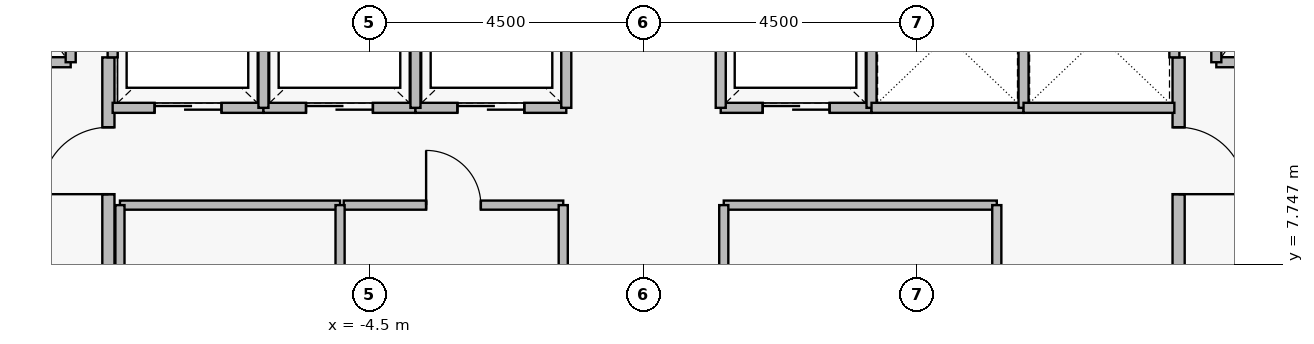
"""IFC4 building model, lengths in metres.
Left out: names, types, materials, properties, quantities, classifications, styles, units other than length and angle.
Written with IfcOpenShell. Run it as: python <this file> out.ifc"""

import sys

from ifc_helpers import new_model, si_unit, direction, frame, frame_2d, origin, place, context, subcontext, project, spatial, rectangle, extrude, element, fill, save


model = new_model("IFC4")
c1 = context("Model", 3, precision=1e-05, world=origin(), true_north=direction((0.0, 1.0)))
c2 = subcontext(c1, "Body", "Model", "MODEL_VIEW")
j1 = project(units=[si_unit("LENGTHUNIT", "METRE"), si_unit("PLANEANGLEUNIT", "RADIAN")], contexts=[c1])
p1 = place(None, origin())
s1 = spatial("IfcSite", under=j1, at=p1, CompositionType="ELEMENT")
p2 = place(p1, origin())
s2 = spatial("IfcBuilding", under=s1, at=p2, CompositionType="ELEMENT")
p3 = place(p2, frame((0.0, 0.0, 18.0)))
s3 = spatial("IfcBuildingStorey", under=s2, at=p3, CompositionType="ELEMENT", Elevation=18.0)
p4 = place(p3, frame((-8.8, 5.05, 0.0), z_axis=(0.0, 0.0, 1.0), x_axis=(0.0, 1.0, 0.0)))
e1 = element("IfcWall", 1, at=p4, inside=s3, PredefinedType="PARTITIONING", context=c2, shape_type="SweptSolid", body=[
    extrude(rectangle(XDim=6.1, YDim=0.2, at=frame_2d((3.05, 0.0))), origin(), (0.0, 0.0, 1.0), 4.54),
])
p5 = place(p4, frame((0.25, 0.0, 0.0)))
e2 = element("IfcOpeningElement", 2, at=p5, cuts=e1, PredefinedType="OPENING", context=c2, shape_type="SweptSolid", body=[
    extrude(rectangle(XDim=1.1, YDim=2.2, at=frame_2d((0.55, 1.1))), frame((0.0, 0.11, 0.0), z_axis=(0.0, -1.0, 0.0), x_axis=(1.0, 0.0, 0.0)), (0.0, 0.0, 1.0), 0.22),
])
p6 = place(p4, frame((3.85, 0.0, 0.0)))
e3 = element("IfcOpeningElement", 3, at=p6, cuts=e1, PredefinedType="OPENING", context=c2, shape_type="SweptSolid", body=[
    extrude(rectangle(XDim=1.1, YDim=2.2, at=frame_2d((0.55, 1.1))), frame((0.0, 0.11, 0.0), z_axis=(0.0, -1.0, 0.0), x_axis=(1.0, 0.0, 0.0)), (0.0, 0.0, 1.0), 0.22),
])
p7 = place(p3, frame((8.8, 11.15, 0.0), z_axis=(0.0, 0.0, 1.0), x_axis=(0.0, -1.0, 0.0)))
e4 = element("IfcWall", 4, at=p7, inside=s3, PredefinedType="PARTITIONING", context=c2, shape_type="SweptSolid", body=[
    extrude(rectangle(XDim=6.1, YDim=0.2, at=frame_2d((3.05, 0.0))), origin(), (0.0, 0.0, 1.0), 4.54),
])
p8 = place(p7, frame((1.15, 0.0, 0.0)))
e5 = element("IfcOpeningElement", 5, at=p8, cuts=e4, PredefinedType="OPENING", context=c2, shape_type="SweptSolid", body=[
    extrude(rectangle(XDim=1.1, YDim=2.2, at=frame_2d((0.55, 1.1))), frame((0.0, 0.11, 0.0), z_axis=(0.0, -1.0, 0.0), x_axis=(1.0, 0.0, 0.0)), (0.0, 0.0, 1.0), 0.22),
])
p9 = place(p7, frame((4.75, 0.0, 0.0)))
e6 = element("IfcOpeningElement", 6, at=p9, cuts=e4, PredefinedType="OPENING", context=c2, shape_type="SweptSolid", body=[
    extrude(rectangle(XDim=1.1, YDim=2.2, at=frame_2d((0.55, 1.1))), frame((0.0, 0.11, 0.0), z_axis=(0.0, -1.0, 0.0), x_axis=(1.0, 0.0, 0.0)), (0.0, 0.0, 1.0), 0.22),
])
p10 = place(p3, frame((-11.58, 11.07, 0.0), z_axis=(0.0, 0.0, 1.0), x_axis=(1.0, 0.0, 0.0)))
e7 = element("IfcWall", 7, at=p10, inside=s3, PredefinedType="PARTITIONING", context=c2, shape_type="SweptSolid", body=[
    extrude(rectangle(XDim=2.16, YDim=0.165, at=frame_2d((1.08, 0.0))), origin(), (0.0, 0.0, 1.0), 4.54),
])
p11 = place(p10, frame((0.53, 0.0, 0.0)))
e8 = element("IfcOpeningElement", 8, at=p11, cuts=e7, PredefinedType="OPENING", context=c2, shape_type="SweptSolid", body=[
    extrude(rectangle(XDim=1.15, YDim=2.25, at=frame_2d((0.575, 1.125))), frame((0.0, 0.093, 0.0), z_axis=(0.0, -1.0, 0.0), x_axis=(1.0, 0.0, 0.0)), (0.0, 0.0, 1.0), 0.185),
])
p12 = place(p3, frame((9.42, 11.07, 0.0), z_axis=(0.0, 0.0, 1.0), x_axis=(1.0, 0.0, 0.0)))
e9 = element("IfcWall", 9, at=p12, inside=s3, PredefinedType="PARTITIONING", context=c2, shape_type="SweptSolid", body=[
    extrude(rectangle(XDim=2.16, YDim=0.165, at=frame_2d((1.08, 0.0))), origin(), (0.0, 0.0, 1.0), 4.54),
])
p13 = place(p12, frame((0.53, 0.0, 0.0)))
e10 = element("IfcOpeningElement", 10, at=p13, cuts=e9, PredefinedType="OPENING", context=c2, shape_type="SweptSolid", body=[
    extrude(rectangle(XDim=1.15, YDim=2.25, at=frame_2d((0.575, 1.125))), frame((0.0, 0.093, 0.0), z_axis=(0.0, -1.0, 0.0), x_axis=(1.0, 0.0, 0.0)), (0.0, 0.0, 1.0), 0.185),
])
p14 = place(p3, frame((-8.73, 10.32, 0.0), z_axis=(0.0, 0.0, 1.0), x_axis=(1.0, 0.0, 0.0)))
e11 = element("IfcWall", 11, at=p14, inside=s3, PredefinedType="PARTITIONING", context=c2, shape_type="SweptSolid", body=[
    extrude(rectangle(XDim=2.48, YDim=0.165, at=frame_2d((1.24, 0.0))), origin(), (0.0, 0.0, 1.0), 4.54),
])
p15 = place(p14, frame((0.69, 0.0, 0.0)))
e12 = element("IfcOpeningElement", 12, at=p15, cuts=e11, PredefinedType="OPENING", context=c2, shape_type="SweptSolid", body=[
    extrude(rectangle(XDim=1.1, YDim=2.25, at=frame_2d((0.55, 1.125))), frame((0.0, 0.093, 0.0), z_axis=(0.0, -1.0, 0.0), x_axis=(1.0, 0.0, 0.0)), (0.0, 0.0, 1.0), 0.185),
])
p16 = place(p3, frame((-6.25, 10.32, 0.0), z_axis=(0.0, 0.0, 1.0), x_axis=(1.0, 0.0, 0.0)))
e13 = element("IfcWall", 13, at=p16, inside=s3, PredefinedType="PARTITIONING", context=c2, shape_type="SweptSolid", body=[
    extrude(rectangle(XDim=2.5, YDim=0.165, at=frame_2d((1.25, 0.0))), origin(), (0.0, 0.0, 1.0), 4.54),
])
p17 = place(p16, frame((0.7, 0.0, 0.0)))
e14 = element("IfcOpeningElement", 14, at=p17, cuts=e13, PredefinedType="OPENING", context=c2, shape_type="SweptSolid", body=[
    extrude(rectangle(XDim=1.1, YDim=2.25, at=frame_2d((0.55, 1.125))), frame((0.0, 0.093, 0.0), z_axis=(0.0, -1.0, 0.0), x_axis=(1.0, 0.0, 0.0)), (0.0, 0.0, 1.0), 0.185),
])
p18 = place(p3, frame((-3.75, 10.32, 0.0), z_axis=(0.0, 0.0, 1.0), x_axis=(1.0, 0.0, 0.0)))
e15 = element("IfcWall", 15, at=p18, inside=s3, PredefinedType="PARTITIONING", context=c2, shape_type="SweptSolid", body=[
    extrude(rectangle(XDim=2.48, YDim=0.165, at=frame_2d((1.24, 0.0))), origin(), (0.0, 0.0, 1.0), 4.54),
])
p19 = place(p18, frame((0.69, 0.0, 0.0)))
e16 = element("IfcOpeningElement", 16, at=p19, cuts=e15, PredefinedType="OPENING", context=c2, shape_type="SweptSolid", body=[
    extrude(rectangle(XDim=1.1, YDim=2.25, at=frame_2d((0.55, 1.125))), frame((0.0, 0.093, 0.0), z_axis=(0.0, -1.0, 0.0), x_axis=(1.0, 0.0, 0.0)), (0.0, 0.0, 1.0), 0.185),
])
p20 = place(p3, frame((1.27, 10.32, 0.0), z_axis=(0.0, 0.0, 1.0), x_axis=(1.0, 0.0, 0.0)))
e17 = element("IfcWall", 17, at=p20, inside=s3, PredefinedType="PARTITIONING", context=c2, shape_type="SweptSolid", body=[
    extrude(rectangle(XDim=2.48, YDim=0.165, at=frame_2d((1.24, 0.0))), origin(), (0.0, 0.0, 1.0), 4.54),
])
p21 = place(p20, frame((0.69, 0.0, 0.0)))
e18 = element("IfcOpeningElement", 18, at=p21, cuts=e17, PredefinedType="OPENING", context=c2, shape_type="SweptSolid", body=[
    extrude(rectangle(XDim=1.1, YDim=2.25, at=frame_2d((0.55, 1.125))), frame((0.0, 0.093, 0.0), z_axis=(0.0, -1.0, 0.0), x_axis=(1.0, 0.0, 0.0)), (0.0, 0.0, 1.0), 0.185),
])
p22 = place(p3, frame((-4.93, 8.72, 0.0), z_axis=(0.0, 0.0, 1.0), x_axis=(1.0, 0.0, 0.0)))
e19 = element("IfcWall", 19, at=p22, inside=s3, PredefinedType="PARTITIONING", context=c2, shape_type="SweptSolid", body=[
    extrude(rectangle(XDim=3.61, YDim=0.15, at=frame_2d((1.805, 0.0))), origin(), (0.0, 0.0, 1.0), 4.54),
])
p23 = place(p22, frame((1.355, 0.0, 0.0)))
e20 = element("IfcOpeningElement", 20, at=p23, cuts=e19, PredefinedType="OPENING", context=c2, shape_type="SweptSolid", body=[
    extrude(rectangle(XDim=0.9, YDim=2.15, at=frame_2d((0.45, 1.075))), frame((0.0, 0.085, 0.0), z_axis=(0.0, -1.0, 0.0), x_axis=(1.0, 0.0, 0.0)), (0.0, 0.0, 1.0), 0.17),
])
for number, where, z_axis, x_axis in (
    (21, (-9.42, 11.07, 0.0), (0.0, 0.0, 1.0), (0.0, 1.0, 0.0)),
    (22, (9.42, 11.07, 0.0), (0.0, 0.0, 1.0), (0.0, 1.0, 0.0)),
):
    element("IfcWall", number, at=place(p3, frame(where, z_axis=z_axis, x_axis=x_axis)), inside=s3, PredefinedType="PARTITIONING", context=c2, shape_type="SweptSolid", body=[
        extrude(rectangle(XDim=2.96, YDim=0.165, at=frame_2d((1.48, 0.0))), origin(), (0.0, 0.0, 1.0), 4.54),
    ])
p24 = place(p3, frame((-8.73, 11.15, 0.0), z_axis=(0.0, 0.0, 1.0), x_axis=(0.0, 1.0, 0.0)))
e23 = element("IfcWall", 23, at=p24, inside=s3, PredefinedType="PARTITIONING", context=c2, shape_type="SweptSolid", body=[
    extrude(rectangle(XDim=1.53, YDim=0.165, at=frame_2d((0.765, 0.0))), origin(), (0.0, 0.0, 1.0), 4.54),
])
for number, where, z_axis, x_axis in (
    (24, (-6.25, 10.32, 0.0), (0.0, 0.0, 1.0), (0.0, 1.0, 0.0)),
    (25, (-3.75, 10.32, 0.0), (0.0, 0.0, 1.0), (0.0, 1.0, 0.0)),
    (26, (-1.27, 10.32, 0.0), (0.0, 0.0, 1.0), (0.0, 1.0, 0.0)),
    (27, (1.27, 10.32, 0.0), (0.0, 0.0, 1.0), (0.0, 1.0, 0.0)),
    (28, (3.75, 10.32, 0.0), (0.0, 0.0, 1.0), (0.0, 1.0, 0.0)),
):
    element("IfcWall", number, at=place(p3, frame(where, z_axis=z_axis, x_axis=x_axis)), inside=s3, PredefinedType="PARTITIONING", context=c2, shape_type="SweptSolid", body=[
        extrude(rectangle(XDim=2.36, YDim=0.165, at=frame_2d((1.18, 0.0))), origin(), (0.0, 0.0, 1.0), 4.54),
    ])
p25 = place(p3, frame((3.75, 10.32, 0.0), z_axis=(0.0, 0.0, 1.0), x_axis=(1.0, 0.0, 0.0)))
e29 = element("IfcWall", 29, at=p25, inside=s3, PredefinedType="PARTITIONING", context=c2, shape_type="SweptSolid", body=[
    extrude(rectangle(XDim=2.5, YDim=0.165, at=frame_2d((1.25, 0.0))), origin(), (0.0, 0.0, 1.0), 4.54),
])
p26 = place(p3, frame((6.25, 10.32, 0.0), z_axis=(0.0, 0.0, 1.0), x_axis=(0.0, 1.0, 0.0)))
e30 = element("IfcWall", 30, at=p26, inside=s3, PredefinedType="PARTITIONING", context=c2, shape_type="SweptSolid", body=[
    extrude(rectangle(XDim=2.36, YDim=0.165, at=frame_2d((1.18, 0.0))), origin(), (0.0, 0.0, 1.0), 4.54),
])
p27 = place(p3, frame((6.25, 10.32, 0.0), z_axis=(0.0, 0.0, 1.0), x_axis=(1.0, 0.0, 0.0)))
e31 = element("IfcWall", 31, at=p27, inside=s3, PredefinedType="PARTITIONING", context=c2, shape_type="SweptSolid", body=[
    extrude(rectangle(XDim=2.48, YDim=0.165, at=frame_2d((1.24, 0.0))), origin(), (0.0, 0.0, 1.0), 4.54),
])
p28 = place(p3, frame((8.73, 11.15, 0.0), z_axis=(0.0, 0.0, 1.0), x_axis=(0.0, 1.0, 0.0)))
e32 = element("IfcWall", 32, at=p28, inside=s3, PredefinedType="PARTITIONING", context=c2, shape_type="SweptSolid", body=[
    extrude(rectangle(XDim=1.53, YDim=0.165, at=frame_2d((0.765, 0.0))), origin(), (0.0, 0.0, 1.0), 4.54),
])
p29 = place(p3, frame((-8.61, 8.72, 0.0), z_axis=(0.0, 0.0, 1.0), x_axis=(1.0, 0.0, 0.0)))
e33 = element("IfcWall", 33, at=p29, inside=s3, PredefinedType="PARTITIONING", context=c2, shape_type="SweptSolid", body=[
    extrude(rectangle(XDim=3.62, YDim=0.15, at=frame_2d((1.81, 0.0))), origin(), (0.0, 0.0, 1.0), 4.54),
])
for number, where, z_axis, x_axis in (
    (34, (-8.61, 6.48, 0.0), (0.0, 0.0, 1.0), (0.0, 1.0, 0.0)),
    (35, (-4.99, 6.48, 0.0), (0.0, 0.0, 1.0), (0.0, 1.0, 0.0)),
    (36, (-1.32, 6.48, 0.0), (0.0, 0.0, 1.0), (0.0, 1.0, 0.0)),
):
    element("IfcWall", number, at=place(p3, frame(where, z_axis=z_axis, x_axis=x_axis)), inside=s3, PredefinedType="PARTITIONING", context=c2, shape_type="SweptSolid", body=[
        extrude(rectangle(XDim=2.24, YDim=0.15, at=frame_2d((1.12, 0.0))), origin(), (0.0, 0.0, 1.0), 4.54),
    ])
p30 = place(p3, frame((1.32, 8.72, 0.0), z_axis=(0.0, 0.0, 1.0), x_axis=(1.0, 0.0, 0.0)))
e37 = element("IfcWall", 37, at=p30, inside=s3, PredefinedType="PARTITIONING", context=c2, shape_type="SweptSolid", body=[
    extrude(rectangle(XDim=4.49, YDim=0.15, at=frame_2d((2.245, 0.0))), origin(), (0.0, 0.0, 1.0), 4.54),
])
for number, where, z_axis, x_axis in (
    (38, (1.32, 6.48, 0.0), (0.0, 0.0, 1.0), (0.0, 1.0, 0.0)),
    (39, (5.81, 6.48, 0.0), (0.0, 0.0, 1.0), (0.0, 1.0, 0.0)),
):
    element("IfcWall", number, at=place(p3, frame(where, z_axis=z_axis, x_axis=x_axis)), inside=s3, PredefinedType="PARTITIONING", context=c2, shape_type="SweptSolid", body=[
        extrude(rectangle(XDim=2.24, YDim=0.15, at=frame_2d((1.12, 0.0))), origin(), (0.0, 0.0, 1.0), 4.54),
    ])
p31 = place(p6, origin())
e40 = element("IfcDoor", 40, at=p31, inside=s3, OperationType="SINGLE_SWING_LEFT", PredefinedType="DOOR", context=c2, shape_type="SweptSolid", body=[
    extrude(rectangle(XDim=1.1, YDim=2.2, at=frame_2d((0.55, 1.1))), frame((0.0, 0.025, 0.0), z_axis=(0.0, -1.0, 0.0), x_axis=(1.0, 0.0, 0.0)), (0.0, 0.0, 1.0), 0.05),
])
fill(e3, e40)
p32 = place(p8, origin())
e41 = element("IfcDoor", 41, at=p32, inside=s3, OperationType="SINGLE_SWING_RIGHT", PredefinedType="DOOR", context=c2, shape_type="SweptSolid", body=[
    extrude(rectangle(XDim=1.1, YDim=2.2, at=frame_2d((0.55, 1.1))), frame((0.0, 0.025, 0.0), z_axis=(0.0, -1.0, 0.0), x_axis=(1.0, 0.0, 0.0)), (0.0, 0.0, 1.0), 0.05),
])
fill(e5, e41)
p33 = place(p15, origin())
e42 = element("IfcDoor", 42, at=p33, inside=s3, OperationType="SLIDING_TO_LEFT", PredefinedType="DOOR", context=c2, shape_type="SweptSolid", body=[
    extrude(rectangle(XDim=1.1, YDim=2.25, at=frame_2d((0.55, 1.125))), frame((0.0, 0.025, 0.0), z_axis=(0.0, -1.0, 0.0), x_axis=(1.0, 0.0, 0.0)), (0.0, 0.0, 1.0), 0.05),
])
fill(e12, e42)
p34 = place(p17, origin())
e43 = element("IfcDoor", 43, at=p34, inside=s3, OperationType="SLIDING_TO_LEFT", PredefinedType="DOOR", context=c2, shape_type="SweptSolid", body=[
    extrude(rectangle(XDim=1.1, YDim=2.25, at=frame_2d((0.55, 1.125))), frame((0.0, 0.025, 0.0), z_axis=(0.0, -1.0, 0.0), x_axis=(1.0, 0.0, 0.0)), (0.0, 0.0, 1.0), 0.05),
])
fill(e14, e43)
p35 = place(p19, origin())
e44 = element("IfcDoor", 44, at=p35, inside=s3, OperationType="SLIDING_TO_LEFT", PredefinedType="DOOR", context=c2, shape_type="SweptSolid", body=[
    extrude(rectangle(XDim=1.1, YDim=2.25, at=frame_2d((0.55, 1.125))), frame((0.0, 0.025, 0.0), z_axis=(0.0, -1.0, 0.0), x_axis=(1.0, 0.0, 0.0)), (0.0, 0.0, 1.0), 0.05),
])
fill(e16, e44)
p36 = place(p21, origin())
e45 = element("IfcDoor", 45, at=p36, inside=s3, OperationType="SLIDING_TO_LEFT", PredefinedType="DOOR", context=c2, shape_type="SweptSolid", body=[
    extrude(rectangle(XDim=1.1, YDim=2.25, at=frame_2d((0.55, 1.125))), frame((0.0, 0.025, 0.0), z_axis=(0.0, -1.0, 0.0), x_axis=(1.0, 0.0, 0.0)), (0.0, 0.0, 1.0), 0.05),
])
fill(e18, e45)
p37 = place(p23, origin())
e46 = element("IfcDoor", 46, at=p37, inside=s3, OperationType="SINGLE_SWING_LEFT", PredefinedType="DOOR", context=c2, shape_type="SweptSolid", body=[
    extrude(rectangle(XDim=0.9, YDim=2.15, at=frame_2d((0.45, 1.075))), frame((0.0, 0.025, 0.0), z_axis=(0.0, -1.0, 0.0), x_axis=(1.0, 0.0, 0.0)), (0.0, 0.0, 1.0), 0.05),
])
fill(e20, e46)
save(model, sys.argv[1])
